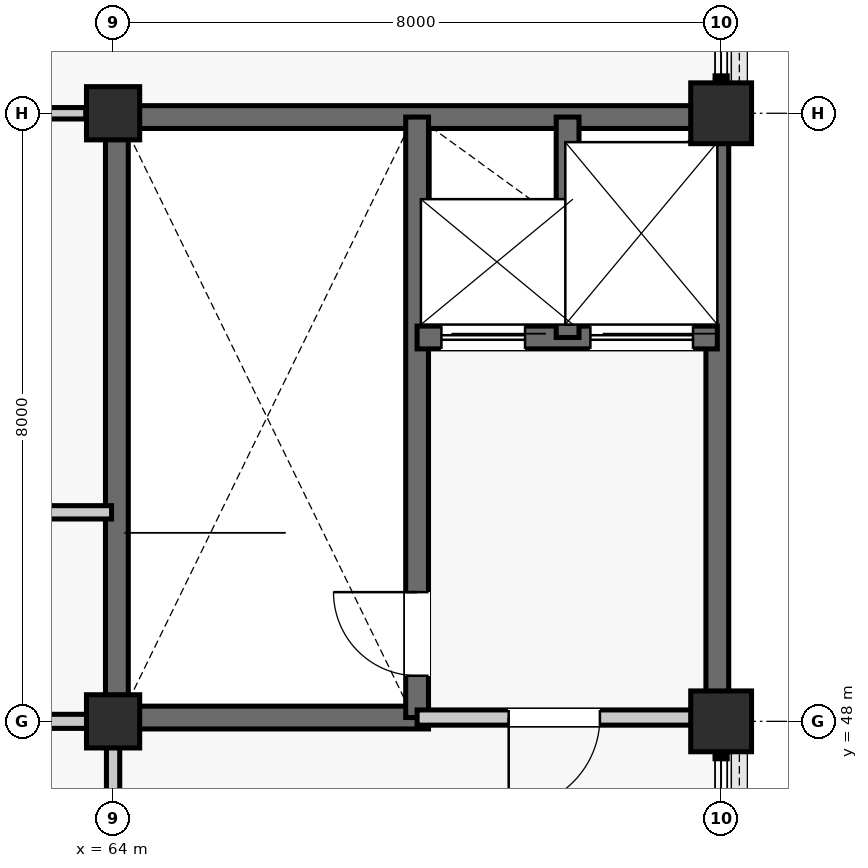
"""IFC4 building model, lengths in metres.
Left out: names, types, materials, properties, quantities, classifications, styles, units other than length and angle.
Written with IfcOpenShell. Run it as: python <this file> out.ifc"""

import sys

from ifc_helpers import new_model, si_unit, direction, frame, frame_2d, origin, origin_2d, place, context, subcontext, project, spatial, rectangle, extrude, element, fill, save


model = new_model("IFC4")
c1 = context("Model", 3, precision=1e-05, world=origin(), true_north=direction((0.0, 1.0)))
c2 = subcontext(c1, "Body", "Model", "MODEL_VIEW")
j1 = project(units=[si_unit("LENGTHUNIT", "METRE"), si_unit("PLANEANGLEUNIT", "RADIAN")], contexts=[c1])
p1 = place(None, origin())
s1 = spatial("IfcSite", under=j1, at=p1, CompositionType="ELEMENT")
p2 = place(p1, origin())
s2 = spatial("IfcBuilding", under=s1, at=p2, CompositionType="ELEMENT")
p3 = place(p2, frame((0.0, 0.0, 17.82)))
s3 = spatial("IfcBuildingStorey", under=s2, at=p3, CompositionType="ELEMENT", Elevation=17.82)
for number, where, z_axis, x_axis in (
    (1, (64.0, 48.0, 0.0), (0.0, 0.0, 1.0), (1.0, 0.0, 0.0)),
    (2, (64.0, 56.0, 0.0), (0.0, 0.0, 1.0), (1.0, 0.0, 0.0)),
):
    element("IfcColumn", number, at=place(p3, frame(where, z_axis=z_axis, x_axis=x_axis)), inside=s3, PredefinedType="COLUMN", context=c2, shape_type="SweptSolid", body=[
        extrude(rectangle(XDim=0.7, YDim=0.7, at=origin_2d()), origin(), (0.0, 0.0, 1.0), 3.96),
    ])
for number, where, z_axis, x_axis in (
    (3, (72.0, 48.0, 0.0), (0.0, 0.0, 1.0), (1.0, 0.0, 0.0)),
    (4, (72.0, 56.0, 0.0), (0.0, 0.0, 1.0), (1.0, 0.0, 0.0)),
):
    element("IfcColumn", number, at=place(p3, frame(where, z_axis=z_axis, x_axis=x_axis)), inside=s3, PredefinedType="COLUMN", context=c2, shape_type="SweptSolid", body=[
        extrude(rectangle(XDim=0.8, YDim=0.8, at=origin_2d()), origin(), (0.0, 0.0, 1.0), 3.96),
    ])
p4 = place(p3, frame((64.05, 48.24, 0.0), z_axis=(0.0, 0.0, 1.0), x_axis=(0.0, 1.0, 0.0)))
e5 = element("IfcWall", 5, at=p4, inside=s3, PredefinedType="SHEAR", context=c2, shape_type="SweptSolid", body=[
    extrude(rectangle(XDim=7.52, YDim=0.3, at=frame_2d((3.76, 0.0))), origin(), (0.0, 0.0, 1.0), 3.437),
])
p5 = place(p3, frame((64.24, 55.95, 0.0), z_axis=(0.0, 0.0, 1.0), x_axis=(1.0, 0.0, 0.0)))
e6 = element("IfcWall", 6, at=p5, inside=s3, PredefinedType="SHEAR", context=c2, shape_type="SweptSolid", body=[
    extrude(rectangle(XDim=7.47, YDim=0.3, at=frame_2d((3.735, 0.0))), origin(), (0.0, 0.0, 1.0), 3.437),
])
p6 = place(p3, frame((71.95, 48.29, 0.0), z_axis=(0.0, 0.0, 1.0), x_axis=(0.0, 1.0, 0.0)))
e7 = element("IfcWall", 7, at=p6, inside=s3, PredefinedType="SHEAR", context=c2, shape_type="SweptSolid", body=[
    extrude(rectangle(XDim=7.42, YDim=0.3, at=frame_2d((3.71, 0.0))), origin(), (0.0, 0.0, 1.0), 2.995),
])
p7 = place(p3, frame((64.24, 48.05, 0.0), z_axis=(0.0, 0.0, 1.0), x_axis=(1.0, 0.0, 0.0)))
e8 = element("IfcWall", 8, at=p7, inside=s3, PredefinedType="SHEAR", context=c2, shape_type="SweptSolid", body=[
    extrude(rectangle(XDim=3.91, YDim=0.3, at=frame_2d((1.955, 0.0))), origin(), (0.0, 0.0, 1.0), 3.226),
])
p8 = place(p3, frame((68.0, 48.05, 0.0), z_axis=(0.0, 0.0, 1.0), x_axis=(0.0, 1.0, 0.0)))
e9 = element("IfcWall", 9, at=p8, inside=s3, PredefinedType="SHEAR", context=c2, shape_type="SweptSolid", body=[
    extrude(rectangle(XDim=7.9, YDim=0.3, at=frame_2d((3.95, 0.0))), origin(), (0.0, 0.0, 1.0), 3.226),
])
p9 = place(p8, frame((0.55, 0.0, 0.0)))
e10 = element("IfcOpeningElement", 10, at=p9, cuts=e9, PredefinedType="OPENING", context=c2, shape_type="SweptSolid", body=[
    extrude(rectangle(XDim=1.1, YDim=2.15, at=frame_2d((0.55, 1.075))), frame((0.0, 0.16, 0.0), z_axis=(0.0, -1.0, 0.0), x_axis=(1.0, 0.0, 0.0)), (0.0, 0.0, 1.0), 0.32),
])
p10 = place(p3, frame((68.0, 53.05, 0.0), z_axis=(0.0, 0.0, 1.0), x_axis=(1.0, 0.0, 0.0)))
e11 = element("IfcWall", 11, at=p10, inside=s3, PredefinedType="SHEAR", context=c2, shape_type="SweptSolid", body=[
    extrude(rectangle(XDim=3.95, YDim=0.3, at=frame_2d((1.975, 0.0))), origin(), (0.0, 0.0, 1.0), 2.995),
])
p11 = place(p10, frame((0.32, 0.0, 0.0)))
e12 = element("IfcOpeningElement", 12, at=p11, cuts=e11, PredefinedType="OPENING", context=c2, shape_type="SweptSolid", body=[
    extrude(rectangle(XDim=1.1, YDim=2.2, at=frame_2d((0.55, 1.1))), frame((0.0, 0.16, 0.0), z_axis=(0.0, -1.0, 0.0), x_axis=(1.0, 0.0, 0.0)), (0.0, 0.0, 1.0), 0.32),
])
p12 = place(p10, frame((2.28, 0.0, 0.0)))
e13 = element("IfcOpeningElement", 13, at=p12, cuts=e11, PredefinedType="OPENING", context=c2, shape_type="SweptSolid", body=[
    extrude(rectangle(XDim=1.35, YDim=2.3, at=frame_2d((0.675, 1.15))), frame((0.0, 0.16, 0.0), z_axis=(0.0, -1.0, 0.0), x_axis=(1.0, 0.0, 0.0)), (0.0, 0.0, 1.0), 0.32),
])
p13 = place(p3, frame((69.98, 53.05, 0.0), z_axis=(0.0, 0.0, 1.0), x_axis=(0.0, 1.0, 0.0)))
e14 = element("IfcWall", 14, at=p13, inside=s3, PredefinedType="SHEAR", context=c2, shape_type="SweptSolid", body=[
    extrude(rectangle(XDim=2.9, YDim=0.3, at=frame_2d((1.45, 0.0))), origin(), (0.0, 0.0, 1.0), 3.735),
])
p14 = place(p3, frame((68.0, 48.05, 0.0), z_axis=(0.0, 0.0, 1.0), x_axis=(1.0, 0.0, 0.0)))
e15 = element("IfcWall", 15, at=p14, inside=s3, PredefinedType="PARTITIONING", context=c2, shape_type="SweptSolid", body=[
    extrude(rectangle(XDim=3.61, YDim=0.2, at=frame_2d((1.805, 0.0))), origin(), (0.0, 0.0, 1.0), 3.226),
])
p15 = place(p14, frame((1.205, 0.0, 0.0)))
e16 = element("IfcOpeningElement", 16, at=p15, cuts=e15, PredefinedType="OPENING", context=c2, shape_type="SweptSolid", body=[
    extrude(rectangle(XDim=1.2, YDim=2.15, at=frame_2d((0.6, 1.075))), frame((0.0, 0.11, 0.0), z_axis=(0.0, -1.0, 0.0), x_axis=(1.0, 0.0, 0.0)), (0.0, 0.0, 1.0), 0.22),
])
p16 = place(p3, frame((58.7, 50.75, 0.0), z_axis=(0.0, 0.0, 1.0), x_axis=(1.0, 0.0, 0.0)))
e17 = element("IfcWall", 17, at=p16, inside=s3, PredefinedType="PARTITIONING", context=c2, shape_type="SweptSolid", body=[
    extrude(rectangle(XDim=5.28, YDim=0.175, at=frame_2d((2.64, 0.0))), origin(), (0.0, 0.0, 1.0), 3.377),
])
p17 = place(p16, frame((2.1, 0.0, 0.0)))
e18 = element("IfcOpeningElement", 18, at=p17, cuts=e17, PredefinedType="OPENING", context=c2, shape_type="SweptSolid", body=[
    extrude(rectangle(XDim=1.08, YDim=2.2, at=frame_2d((0.54, 1.1))), frame((0.0, 0.097, 0.0), z_axis=(0.0, -1.0, 0.0), x_axis=(1.0, 0.0, 0.0)), (0.0, 0.0, 1.0), 0.195),
])
p18 = place(p3, frame((58.75, 56.0, 0.0), z_axis=(0.0, 0.0, 1.0), x_axis=(1.0, 0.0, 0.0)))
e19 = element("IfcWall", 19, at=p18, inside=s3, PredefinedType="PARTITIONING", context=c2, shape_type="SweptSolid", body=[
    extrude(rectangle(XDim=4.89, YDim=0.15, at=frame_2d((2.445, 0.0))), origin(), (0.0, 0.0, 1.0), 3.226),
])
p19 = place(p3, frame((64.0, 40.265, 0.0), z_axis=(0.0, 0.0, 1.0), x_axis=(0.0, 1.0, 0.0)))
e20 = element("IfcWall", 20, at=p19, inside=s3, PredefinedType="PARTITIONING", context=c2, shape_type="SweptSolid", body=[
    extrude(rectangle(XDim=7.395, YDim=0.175, at=frame_2d((3.698, 0.0))), origin(), (0.0, 0.0, 1.0), 3.238),
])
p20 = place(p19, frame((3.073, 0.0, 0.0)))
e21 = element("IfcOpeningElement", 21, at=p20, cuts=e20, PredefinedType="OPENING", context=c2, shape_type="SweptSolid", body=[
    extrude(rectangle(XDim=1.25, YDim=2.18, at=frame_2d((0.625, 1.09))), frame((0.0, 0.097, 0.0), z_axis=(0.0, -1.0, 0.0), x_axis=(1.0, 0.0, 0.0)), (0.0, 0.0, 1.0), 0.195),
])
p21 = place(p3, frame((56.265, 48.0, 0.0), z_axis=(0.0, 0.0, 1.0), x_axis=(1.0, 0.0, 0.0)))
e22 = element("IfcWall", 22, at=p21, inside=s3, PredefinedType="PARTITIONING", context=c2, shape_type="SweptSolid", body=[
    extrude(rectangle(XDim=7.395, YDim=0.185, at=frame_2d((3.698, 0.0))), origin(), (0.0, 0.0, 1.0), 3.238),
])
p22 = place(p9, origin())
e23 = element("IfcDoor", 23, at=p22, inside=s3, OperationType="SINGLE_SWING_RIGHT", PredefinedType="DOOR", context=c2, shape_type="SweptSolid", body=[
    extrude(rectangle(XDim=1.1, YDim=2.15, at=frame_2d((0.55, 1.075))), frame((0.0, 0.025, 0.0), z_axis=(0.0, -1.0, 0.0), x_axis=(1.0, 0.0, 0.0)), (0.0, 0.0, 1.0), 0.05),
])
fill(e10, e23)
p23 = place(p11, origin())
e24 = element("IfcDoor", 24, at=p23, inside=s3, OperationType="SLIDING_TO_LEFT", PredefinedType="DOOR", context=c2, shape_type="SweptSolid", body=[
    extrude(rectangle(XDim=1.1, YDim=2.2, at=frame_2d((0.55, 1.1))), frame((0.0, 0.025, 0.0), z_axis=(0.0, -1.0, 0.0), x_axis=(1.0, 0.0, 0.0)), (0.0, 0.0, 1.0), 0.05),
])
fill(e12, e24)
p24 = place(p12, origin())
e25 = element("IfcDoor", 25, at=p24, inside=s3, OperationType="DOUBLE_DOOR_SLIDING", PredefinedType="DOOR", context=c2, shape_type="SweptSolid", body=[
    extrude(rectangle(XDim=1.35, YDim=2.3, at=frame_2d((0.675, 1.15))), frame((0.0, 0.025, 0.0), z_axis=(0.0, -1.0, 0.0), x_axis=(1.0, 0.0, 0.0)), (0.0, 0.0, 1.0), 0.05),
])
fill(e13, e25)
p25 = place(p15, frame((1.2, 0.0, 0.0), z_axis=(0.0, 0.0, 1.0), x_axis=(-1.0, 0.0, 0.0)))
e26 = element("IfcDoor", 26, at=p25, inside=s3, OperationType="SINGLE_SWING_LEFT", PredefinedType="DOOR", context=c2, shape_type="SweptSolid", body=[
    extrude(rectangle(XDim=1.2, YDim=2.15, at=frame_2d((0.6, 1.075))), frame((0.0, 0.025, 0.0), z_axis=(0.0, -1.0, 0.0), x_axis=(1.0, 0.0, 0.0)), (0.0, 0.0, 1.0), 0.05),
])
fill(e16, e26)
save(model, sys.argv[1])
